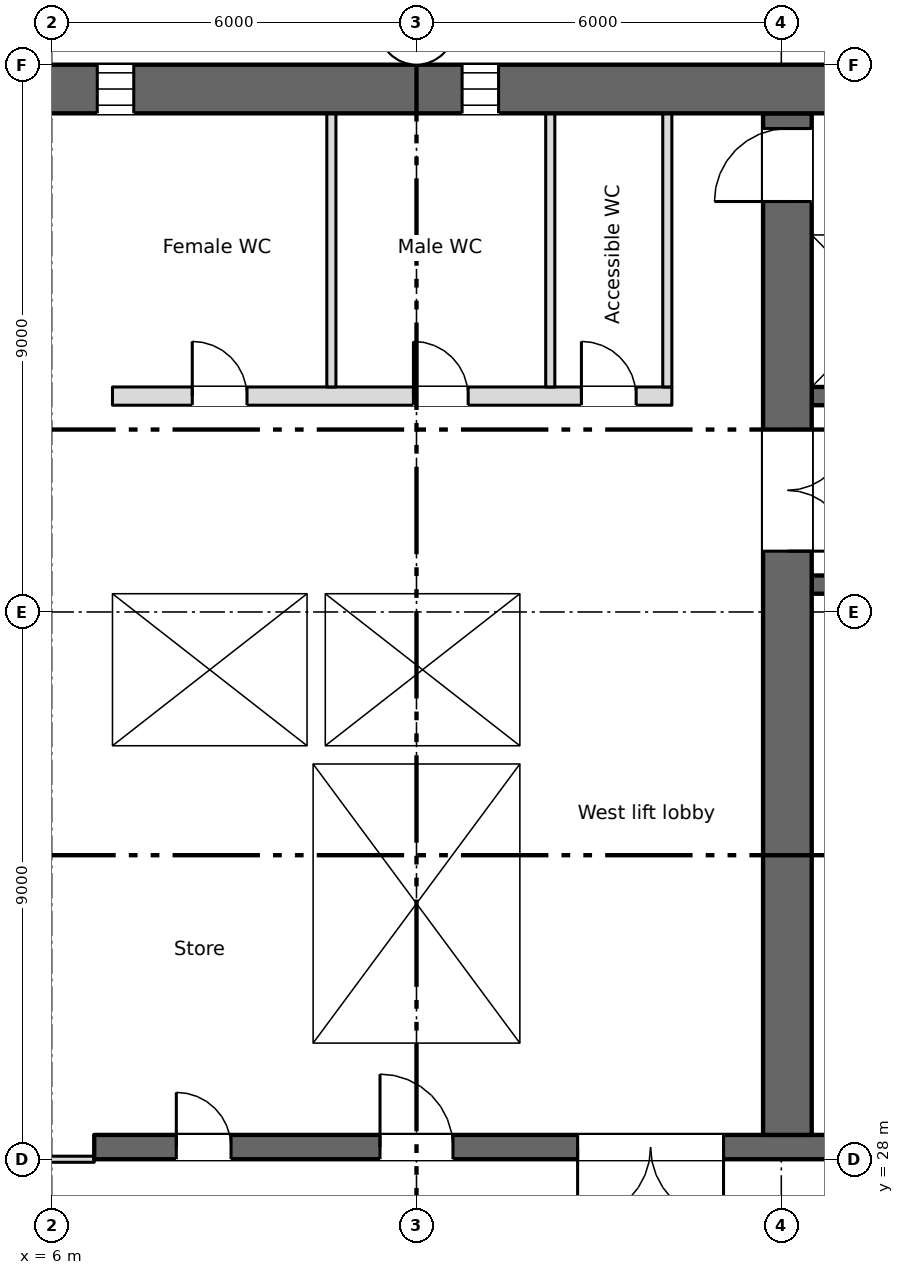
"""IFC4 building model, lengths in metres.
Left out: names, types, materials, properties, quantities, classifications, styles, units other than length and angle.
Written with IfcOpenShell. Run it as: python <this file> out.ifc"""

import sys

from ifc_helpers import new_model, si_unit, direction, frame, frame_2d, origin, place, context, subcontext, project, spatial, rectangle, extrude, element, fill, save


model = new_model("IFC4")
c1 = context("Model", 3, precision=1e-05, world=origin(), true_north=direction((0.0, 1.0)))
c2 = subcontext(c1, "Body", "Model", "MODEL_VIEW")
j1 = project(units=[si_unit("LENGTHUNIT", "METRE"), si_unit("PLANEANGLEUNIT", "RADIAN")], contexts=[c1])
p1 = place(None, origin())
s1 = spatial("IfcSite", under=j1, at=p1, CompositionType="ELEMENT")
p2 = place(p1, origin())
s2 = spatial("IfcBuilding", under=s1, at=p2, CompositionType="ELEMENT")
p3 = place(p2, frame((0.0, 0.0, 106.25)))
s3 = spatial("IfcBuildingStorey", under=s2, at=p3, CompositionType="ELEMENT", Elevation=106.25)
p4 = place(p3, frame((5.55, 45.6, 0.0), z_axis=(0.0, 0.0, 1.0), x_axis=(1.0, 0.0, 0.0)))
e1 = element("IfcWall", 1, at=p4, inside=s3, PredefinedType="SHEAR", context=c2, shape_type="SweptSolid", body=[
    extrude(rectangle(XDim=60.9, YDim=0.8, at=frame_2d((30.45, 0.0))), origin(), (0.0, 0.0, 1.0), 3.35),
])
p5 = place(p4, frame((1.2, 0.0, 0.6)))
e2 = element("IfcOpeningElement", 2, at=p5, cuts=e1, PredefinedType="OPENING", context=c2, shape_type="SweptSolid", body=[
    extrude(rectangle(XDim=0.6, YDim=2.4, at=frame_2d((0.3, 1.2))), frame((0.0, 0.41, 0.0), z_axis=(0.0, -1.0, 0.0), x_axis=(1.0, 0.0, 0.0)), (0.0, 0.0, 1.0), 0.82),
])
p6 = place(p4, frame((7.2, 0.0, 0.6)))
e3 = element("IfcOpeningElement", 3, at=p6, cuts=e1, PredefinedType="OPENING", context=c2, shape_type="SweptSolid", body=[
    extrude(rectangle(XDim=0.6, YDim=2.4, at=frame_2d((0.3, 1.2))), frame((0.0, 0.41, 0.0), z_axis=(0.0, -1.0, 0.0), x_axis=(1.0, 0.0, 0.0)), (0.0, 0.0, 1.0), 0.82),
])
p7 = place(p3, frame((6.7, 28.2, 0.0), z_axis=(0.0, 0.0, 1.0), x_axis=(1.0, 0.0, 0.0)))
e4 = element("IfcWall", 4, at=p7, inside=s3, PredefinedType="SHEAR", context=c2, shape_type="SweptSolid", body=[
    extrude(rectangle(XDim=57.8, YDim=0.4, at=frame_2d((28.9, 0.0))), origin(), (0.0, 0.0, 1.0), 3.35),
])
p8 = place(p7, frame((13.85, 0.0, 0.0)))
e5 = element("IfcOpeningElement", 5, at=p8, cuts=e4, PredefinedType="OPENING", context=c2, shape_type="SweptSolid", body=[
    extrude(rectangle(XDim=0.9, YDim=2.1, at=frame_2d((0.45, 1.05))), frame((0.0, 0.21, 0.0), z_axis=(0.0, -1.0, 0.0), x_axis=(1.0, 0.0, 0.0)), (0.0, 0.0, 1.0), 0.42),
])
p9 = place(p7, frame((48.562, 0.0, 0.0)))
e6 = element("IfcOpeningElement", 6, at=p9, cuts=e4, PredefinedType="OPENING", context=c2, shape_type="SweptSolid", body=[
    extrude(rectangle(XDim=0.9, YDim=2.1, at=frame_2d((0.45, 1.05))), frame((0.0, 0.21, 0.0), z_axis=(0.0, -1.0, 0.0), x_axis=(1.0, 0.0, 0.0)), (0.0, 0.0, 1.0), 0.42),
])
p10 = place(p7, frame((51.137, 0.0, 0.0)))
e7 = element("IfcOpeningElement", 7, at=p10, cuts=e4, PredefinedType="OPENING", context=c2, shape_type="SweptSolid", body=[
    extrude(rectangle(XDim=0.9, YDim=2.1, at=frame_2d((0.45, 1.05))), frame((0.0, 0.21, 0.0), z_axis=(0.0, -1.0, 0.0), x_axis=(1.0, 0.0, 0.0)), (0.0, 0.0, 1.0), 0.42),
])
p11 = place(p7, frame((1.35, 0.0, 0.0)))
e8 = element("IfcOpeningElement", 8, at=p11, cuts=e4, PredefinedType="OPENING", context=c2, shape_type="SweptSolid", body=[
    extrude(rectangle(XDim=0.9, YDim=2.1, at=frame_2d((0.45, 1.05))), frame((0.0, 0.21, 0.0), z_axis=(0.0, -1.0, 0.0), x_axis=(1.0, 0.0, 0.0)), (0.0, 0.0, 1.0), 0.42),
])
p12 = place(p7, frame((4.7, 0.0, 0.0)))
e9 = element("IfcOpeningElement", 9, at=p12, cuts=e4, PredefinedType="OPENING", context=c2, shape_type="SweptSolid", body=[
    extrude(rectangle(XDim=1.2, YDim=2.1, at=frame_2d((0.6, 1.05))), frame((0.0, 0.21, 0.0), z_axis=(0.0, -1.0, 0.0), x_axis=(1.0, 0.0, 0.0)), (0.0, 0.0, 1.0), 0.42),
])
p13 = place(p7, frame((31.7, 0.0, 0.0)))
e10 = element("IfcOpeningElement", 10, at=p13, cuts=e4, PredefinedType="OPENING", context=c2, shape_type="SweptSolid", body=[
    extrude(rectangle(XDim=1.2, YDim=2.1, at=frame_2d((0.6, 1.05))), frame((0.0, 0.21, 0.0), z_axis=(0.0, -1.0, 0.0), x_axis=(1.0, 0.0, 0.0)), (0.0, 0.0, 1.0), 0.42),
])
p14 = place(p7, frame((55.2, 0.0, 0.0)))
e11 = element("IfcOpeningElement", 11, at=p14, cuts=e4, PredefinedType="OPENING", context=c2, shape_type="SweptSolid", body=[
    extrude(rectangle(XDim=1.2, YDim=2.1, at=frame_2d((0.6, 1.05))), frame((0.0, 0.21, 0.0), z_axis=(0.0, -1.0, 0.0), x_axis=(1.0, 0.0, 0.0)), (0.0, 0.0, 1.0), 0.42),
])
p15 = place(p7, frame((21.7, 0.0, 0.0)))
e12 = element("IfcOpeningElement", 12, at=p15, cuts=e4, PredefinedType="OPENING", context=c2, shape_type="SweptSolid", body=[
    extrude(rectangle(XDim=1.2, YDim=2.1, at=frame_2d((0.6, 1.05))), frame((0.0, 0.21, 0.0), z_axis=(0.0, -1.0, 0.0), x_axis=(1.0, 0.0, 0.0)), (0.0, 0.0, 1.0), 0.42),
])
p16 = place(p7, frame((41.7, 0.0, 0.0)))
e13 = element("IfcOpeningElement", 13, at=p16, cuts=e4, PredefinedType="OPENING", context=c2, shape_type="SweptSolid", body=[
    extrude(rectangle(XDim=1.2, YDim=2.1, at=frame_2d((0.6, 1.05))), frame((0.0, 0.21, 0.0), z_axis=(0.0, -1.0, 0.0), x_axis=(1.0, 0.0, 0.0)), (0.0, 0.0, 1.0), 0.42),
])
p17 = place(p7, frame((24.85, 0.0, 0.0)))
e14 = element("IfcOpeningElement", 14, at=p17, cuts=e4, PredefinedType="OPENING", context=c2, shape_type="SweptSolid", body=[
    extrude(rectangle(XDim=2.4, YDim=2.1, at=frame_2d((1.2, 1.05))), frame((0.0, 0.21, 0.0), z_axis=(0.0, -1.0, 0.0), x_axis=(1.0, 0.0, 0.0)), (0.0, 0.0, 1.0), 0.42),
])
p18 = place(p7, frame((37.35, 0.0, 0.0)))
e15 = element("IfcOpeningElement", 15, at=p18, cuts=e4, PredefinedType="OPENING", context=c2, shape_type="SweptSolid", body=[
    extrude(rectangle(XDim=2.4, YDim=2.1, at=frame_2d((1.2, 1.05))), frame((0.0, 0.21, 0.0), z_axis=(0.0, -1.0, 0.0), x_axis=(1.0, 0.0, 0.0)), (0.0, 0.0, 1.0), 0.42),
])
p19 = place(p7, frame((7.95, 0.0, 0.0)))
e16 = element("IfcOpeningElement", 16, at=p19, cuts=e4, PredefinedType="OPENING", context=c2, shape_type="SweptSolid", body=[
    extrude(rectangle(XDim=2.4, YDim=2.1, at=frame_2d((1.2, 1.05))), frame((0.0, 0.21, 0.0), z_axis=(0.0, -1.0, 0.0), x_axis=(1.0, 0.0, 0.0)), (0.0, 0.0, 1.0), 0.42),
])
p20 = place(p7, frame((28.85, 0.0, 0.0)))
e17 = element("IfcOpeningElement", 17, at=p20, cuts=e4, PredefinedType="OPENING", context=c2, shape_type="SweptSolid", body=[
    extrude(rectangle(XDim=0.9, YDim=2.1, at=frame_2d((0.45, 1.05))), frame((0.0, 0.21, 0.0), z_axis=(0.0, -1.0, 0.0), x_axis=(1.0, 0.0, 0.0)), (0.0, 0.0, 1.0), 0.42),
])
p21 = place(p7, frame((34.85, 0.0, 0.0)))
e18 = element("IfcOpeningElement", 18, at=p21, cuts=e4, PredefinedType="OPENING", context=c2, shape_type="SweptSolid", body=[
    extrude(rectangle(XDim=0.9, YDim=2.1, at=frame_2d((0.45, 1.05))), frame((0.0, 0.21, 0.0), z_axis=(0.0, -1.0, 0.0), x_axis=(1.0, 0.0, 0.0)), (0.0, 0.0, 1.0), 0.42),
])
p22 = place(p3, frame((6.85, 28.4, 0.0), z_axis=(0.0, 0.0, 1.0), x_axis=(0.0, 1.0, 0.0)))
e19 = element("IfcWall", 19, at=p22, inside=s3, PredefinedType="SHEAR", context=c2, shape_type="SweptSolid", body=[
    extrude(rectangle(XDim=16.8, YDim=0.3, at=frame_2d((8.4, 0.0))), origin(), (0.0, 0.0, 1.0), 3.35),
])
p23 = place(p3, frame((18.1, 28.4, 0.0), z_axis=(0.0, 0.0, 1.0), x_axis=(0.0, 1.0, 0.0)))
e20 = element("IfcWall", 20, at=p23, inside=s3, PredefinedType="SHEAR", context=c2, shape_type="SweptSolid", body=[
    extrude(rectangle(XDim=16.8, YDim=0.8, at=frame_2d((8.4, 0.0))), origin(), (0.0, 0.0, 1.0), 3.35),
])
p24 = place(p23, frame((9.6, 0.0, 0.0)))
e21 = element("IfcOpeningElement", 21, at=p24, cuts=e20, PredefinedType="OPENING", context=c2, shape_type="SweptSolid", body=[
    extrude(rectangle(XDim=2.0, YDim=2.1, at=frame_2d((1.0, 1.05))), frame((0.0, 0.41, 0.0), z_axis=(0.0, -1.0, 0.0), x_axis=(1.0, 0.0, 0.0)), (0.0, 0.0, 1.0), 0.82),
])
p25 = place(p23, frame((15.35, 0.0, 0.0)))
e22 = element("IfcOpeningElement", 22, at=p25, cuts=e20, PredefinedType="OPENING", context=c2, shape_type="SweptSolid", body=[
    extrude(rectangle(XDim=1.2, YDim=2.1, at=frame_2d((0.6, 1.05))), frame((0.0, 0.41, 0.0), z_axis=(0.0, -1.0, 0.0), x_axis=(1.0, 0.0, 0.0)), (0.0, 0.0, 1.0), 0.82),
])
for number, where, z_axis, x_axis in (
    (23, (10.15, 28.4, 0.0), (0.0, 0.0, 1.0), (0.0, 1.0, 0.0)),
    (24, (13.85, 28.4, 0.0), (0.0, 0.0, 1.0), (0.0, 1.0, 0.0)),
):
    element("IfcWall", number, at=place(p3, frame(where, z_axis=z_axis, x_axis=x_axis)), inside=s3, PredefinedType="SHEAR", context=c2, shape_type="SweptSolid", body=[
        extrude(rectangle(XDim=6.1, YDim=0.3, at=frame_2d((3.05, 0.0))), origin(), (0.0, 0.0, 1.0), 3.35),
    ])
p26 = place(p3, frame((7.0, 34.65, 0.0), z_axis=(0.0, 0.0, 1.0), x_axis=(1.0, 0.0, 0.0)))
e25 = element("IfcWall", 25, at=p26, inside=s3, PredefinedType="SHEAR", context=c2, shape_type="SweptSolid", body=[
    extrude(rectangle(XDim=7.0, YDim=0.3, at=frame_2d((3.5, 0.0))), origin(), (0.0, 0.0, 1.0), 3.35),
])
p27 = place(p3, frame((18.5, 34.65, 0.0), z_axis=(0.0, 0.0, 1.0), x_axis=(1.0, 0.0, 0.0)))
e26 = element("IfcWall", 26, at=p27, inside=s3, PredefinedType="SHEAR", context=c2, shape_type="SweptSolid", body=[
    extrude(rectangle(XDim=12.2, YDim=0.3, at=frame_2d((6.1, 0.0))), origin(), (0.0, 0.0, 1.0), 3.35),
])
p28 = place(p27, frame((9.8, 0.0, 0.0)))
e27 = element("IfcOpeningElement", 27, at=p28, cuts=e26, PredefinedType="OPENING", context=c2, shape_type="SweptSolid", body=[
    extrude(rectangle(XDim=1.1, YDim=2.1, at=frame_2d((0.55, 1.05))), frame((0.0, 0.16, 0.0), z_axis=(0.0, -1.0, 0.0), x_axis=(1.0, 0.0, 0.0)), (0.0, 0.0, 1.0), 0.32),
])
p29 = place(p3, frame((7.0, 37.45, 0.0), z_axis=(0.0, 0.0, 1.0), x_axis=(1.0, 0.0, 0.0)))
e28 = element("IfcWall", 28, at=p29, inside=s3, PredefinedType="SHEAR", context=c2, shape_type="SweptSolid", body=[
    extrude(rectangle(XDim=7.0, YDim=0.3, at=frame_2d((3.5, 0.0))), origin(), (0.0, 0.0, 1.0), 3.35),
])
p30 = place(p3, frame((30.7, 37.45, 0.0), z_axis=(0.0, 0.0, 1.0), x_axis=(-1.0, 0.0, 0.0)))
e29 = element("IfcWall", 29, at=p30, inside=s3, PredefinedType="SHEAR", context=c2, shape_type="SweptSolid", body=[
    extrude(rectangle(XDim=12.2, YDim=0.3, at=frame_2d((6.1, 0.0))), origin(), (0.0, 0.0, 1.0), 3.35),
])
p31 = place(p30, frame((7.4, 0.0, 0.0)))
e30 = element("IfcOpeningElement", 30, at=p31, cuts=e29, PredefinedType="OPENING", context=c2, shape_type="SweptSolid", body=[
    extrude(rectangle(XDim=0.9, YDim=2.1, at=frame_2d((0.45, 1.05))), frame((0.0, 0.16, 0.0), z_axis=(0.0, -1.0, 0.0), x_axis=(1.0, 0.0, 0.0)), (0.0, 0.0, 1.0), 0.32),
])
p32 = place(p3, frame((13.85, 34.8, 0.0), z_axis=(0.0, 0.0, 1.0), x_axis=(0.0, 1.0, 0.0)))
e31 = element("IfcWall", 31, at=p32, inside=s3, PredefinedType="SHEAR", context=c2, shape_type="SweptSolid", body=[
    extrude(rectangle(XDim=2.5, YDim=0.3, at=frame_2d((1.25, 0.0))), origin(), (0.0, 0.0, 1.0), 3.35),
])
p33 = place(p3, frame((18.5, 40.55, 0.0), z_axis=(0.0, 0.0, 1.0), x_axis=(1.0, 0.0, 0.0)))
e32 = element("IfcWall", 32, at=p33, inside=s3, PredefinedType="SHEAR", context=c2, shape_type="SweptSolid", body=[
    extrude(rectangle(XDim=41.0, YDim=0.3, at=frame_2d((20.5, 0.0))), origin(), (0.0, 0.0, 1.0), 3.35),
])
p34 = place(p33, frame((18.65, 0.0, 0.0)))
e33 = element("IfcOpeningElement", 33, at=p34, cuts=e32, PredefinedType="OPENING", context=c2, shape_type="SweptSolid", body=[
    extrude(rectangle(XDim=0.9, YDim=2.1, at=frame_2d((0.45, 1.05))), frame((0.0, 0.16, 0.0), z_axis=(0.0, -1.0, 0.0), x_axis=(1.0, 0.0, 0.0)), (0.0, 0.0, 1.0), 0.32),
])
p35 = place(p33, frame((6.175, 0.0, 0.0)))
e34 = element("IfcOpeningElement", 34, at=p35, cuts=e32, PredefinedType="OPENING", context=c2, shape_type="SweptSolid", body=[
    extrude(rectangle(XDim=1.1, YDim=2.1, at=frame_2d((0.55, 1.05))), frame((0.0, 0.16, 0.0), z_axis=(0.0, -1.0, 0.0), x_axis=(1.0, 0.0, 0.0)), (0.0, 0.0, 1.0), 0.32),
])
p36 = place(p33, frame((8.925, 0.0, 0.0)))
e35 = element("IfcOpeningElement", 35, at=p36, cuts=e32, PredefinedType="OPENING", context=c2, shape_type="SweptSolid", body=[
    extrude(rectangle(XDim=1.1, YDim=2.1, at=frame_2d((0.55, 1.05))), frame((0.0, 0.16, 0.0), z_axis=(0.0, -1.0, 0.0), x_axis=(1.0, 0.0, 0.0)), (0.0, 0.0, 1.0), 0.32),
])
p37 = place(p33, frame((11.675, 0.0, 0.0)))
e36 = element("IfcOpeningElement", 36, at=p37, cuts=e32, PredefinedType="OPENING", context=c2, shape_type="SweptSolid", body=[
    extrude(rectangle(XDim=1.1, YDim=2.1, at=frame_2d((0.55, 1.05))), frame((0.0, 0.16, 0.0), z_axis=(0.0, -1.0, 0.0), x_axis=(1.0, 0.0, 0.0)), (0.0, 0.0, 1.0), 0.32),
])
p38 = place(p33, frame((30.925, 0.0, 0.0)))
e37 = element("IfcOpeningElement", 37, at=p38, cuts=e32, PredefinedType="OPENING", context=c2, shape_type="SweptSolid", body=[
    extrude(rectangle(XDim=1.1, YDim=2.1, at=frame_2d((0.55, 1.05))), frame((0.0, 0.16, 0.0), z_axis=(0.0, -1.0, 0.0), x_axis=(1.0, 0.0, 0.0)), (0.0, 0.0, 1.0), 0.32),
])
p39 = place(p33, frame((33.675, 0.0, 0.0)))
e38 = element("IfcOpeningElement", 38, at=p39, cuts=e32, PredefinedType="OPENING", context=c2, shape_type="SweptSolid", body=[
    extrude(rectangle(XDim=1.1, YDim=2.1, at=frame_2d((0.55, 1.05))), frame((0.0, 0.16, 0.0), z_axis=(0.0, -1.0, 0.0), x_axis=(1.0, 0.0, 0.0)), (0.0, 0.0, 1.0), 0.32),
])
p40 = place(p33, frame((36.375, 0.0, 0.0)))
e39 = element("IfcOpeningElement", 39, at=p40, cuts=e32, PredefinedType="OPENING", context=c2, shape_type="SweptSolid", body=[
    extrude(rectangle(XDim=1.2, YDim=2.1, at=frame_2d((0.6, 1.05))), frame((0.0, 0.16, 0.0), z_axis=(0.0, -1.0, 0.0), x_axis=(1.0, 0.0, 0.0)), (0.0, 0.0, 1.0), 0.32),
])
p41 = place(p33, frame((39.15, 0.0, 0.0)))
e40 = element("IfcOpeningElement", 40, at=p41, cuts=e32, PredefinedType="OPENING", context=c2, shape_type="SweptSolid", body=[
    extrude(rectangle(XDim=1.2, YDim=2.1, at=frame_2d((0.6, 1.05))), frame((0.0, 0.16, 0.0), z_axis=(0.0, -1.0, 0.0), x_axis=(1.0, 0.0, 0.0)), (0.0, 0.0, 1.0), 0.32),
])
p42 = place(p3, frame((18.5, 43.35, 0.0), z_axis=(0.0, 0.0, 1.0), x_axis=(1.0, 0.0, 0.0)))
e41 = element("IfcWall", 41, at=p42, inside=s3, PredefinedType="SHEAR", context=c2, shape_type="SweptSolid", body=[
    extrude(rectangle(XDim=41.0, YDim=0.3, at=frame_2d((20.5, 0.0))), origin(), (0.0, 0.0, 1.0), 3.35),
])
p43 = place(p3, frame((7.0, 40.55, 0.0), z_axis=(0.0, 0.0, 1.0), x_axis=(1.0, 0.0, 0.0)))
e42 = element("IfcWall", 42, at=p43, inside=s3, PredefinedType="PARTITIONING", context=c2, shape_type="SweptSolid", body=[
    extrude(rectangle(XDim=9.2, YDim=0.3, at=frame_2d((4.6, 0.0))), origin(), (0.0, 0.0, 1.0), 3.35),
])
p44 = place(p43, frame((1.312, 0.0, 0.0)))
e43 = element("IfcOpeningElement", 43, at=p44, cuts=e42, PredefinedType="OPENING", context=c2, shape_type="SweptSolid", body=[
    extrude(rectangle(XDim=0.9, YDim=2.1, at=frame_2d((0.45, 1.05))), frame((0.0, 0.16, 0.0), z_axis=(0.0, -1.0, 0.0), x_axis=(1.0, 0.0, 0.0)), (0.0, 0.0, 1.0), 0.32),
])
p45 = place(p43, frame((4.95, 0.0, 0.0)))
e44 = element("IfcOpeningElement", 44, at=p45, cuts=e42, PredefinedType="OPENING", context=c2, shape_type="SweptSolid", body=[
    extrude(rectangle(XDim=0.9, YDim=2.1, at=frame_2d((0.45, 1.05))), frame((0.0, 0.16, 0.0), z_axis=(0.0, -1.0, 0.0), x_axis=(1.0, 0.0, 0.0)), (0.0, 0.0, 1.0), 0.32),
])
p46 = place(p43, frame((7.712, 0.0, 0.0)))
e45 = element("IfcOpeningElement", 45, at=p46, cuts=e42, PredefinedType="OPENING", context=c2, shape_type="SweptSolid", body=[
    extrude(rectangle(XDim=0.9, YDim=2.1, at=frame_2d((0.45, 1.05))), frame((0.0, 0.16, 0.0), z_axis=(0.0, -1.0, 0.0), x_axis=(1.0, 0.0, 0.0)), (0.0, 0.0, 1.0), 0.32),
])
p47 = place(p3, frame((10.35, 34.8, 0.0), z_axis=(0.0, 0.0, 1.0), x_axis=(0.0, 1.0, 0.0)))
e46 = element("IfcWall", 46, at=p47, inside=s3, PredefinedType="SHEAR", context=c2, shape_type="SweptSolid", body=[
    extrude(rectangle(XDim=2.5, YDim=0.3, at=frame_2d((1.25, 0.0))), origin(), (0.0, 0.0, 1.0), 3.35),
])
for number, where, z_axis, x_axis in (
    (47, (16.125, 40.7, 0.0), (0.0, 0.0, 1.0), (0.0, 1.0, 0.0)),
    (48, (10.6, 40.7, 0.0), (0.0, 0.0, 1.0), (0.0, 1.0, 0.0)),
    (49, (14.2, 40.7, 0.0), (0.0, 0.0, 1.0), (0.0, 1.0, 0.0)),
):
    element("IfcWall", number, at=place(p3, frame(where, z_axis=z_axis, x_axis=x_axis)), inside=s3, PredefinedType="PARTITIONING", context=c2, shape_type="SweptSolid", body=[
        extrude(rectangle(XDim=4.5, YDim=0.15, at=frame_2d((2.25, 0.0))), origin(), (0.0, 0.0, 1.0), 3.35),
    ])
p48 = place(p3, frame((0.7, 28.0, 0.0), z_axis=(0.0, 0.0, 1.0), x_axis=(1.0, 0.0, 0.0)))
e50 = element("IfcWall", 50, at=p48, inside=s3, PredefinedType="PARTITIONING", context=c2, shape_type="SweptSolid", body=[
    extrude(rectangle(XDim=6.0, YDim=0.1, at=frame_2d((3.0, 0.0))), origin(), (0.0, 0.0, 1.0), 3.35),
])
p49 = place(p48, frame((2.1, 0.0, 0.0)))
e51 = element("IfcOpeningElement", 51, at=p49, cuts=e50, PredefinedType="OPENING", context=c2, shape_type="SweptSolid", body=[
    extrude(rectangle(XDim=1.8, YDim=2.1, at=frame_2d((0.9, 1.05))), frame((0.0, 0.06, 0.0), z_axis=(0.0, -1.0, 0.0), x_axis=(1.0, 0.0, 0.0)), (0.0, 0.0, 1.0), 0.12),
])
p50 = place(p5, origin())
e52 = element("IfcWindow", 52, at=p50, inside=s3, PartitioningType="SINGLE_PANEL", PredefinedType="WINDOW", context=c2, shape_type="SweptSolid", body=[
    extrude(rectangle(XDim=0.6, YDim=2.4, at=frame_2d((0.3, 1.2))), frame((0.0, 0.03, 0.0), z_axis=(0.0, -1.0, 0.0), x_axis=(1.0, 0.0, 0.0)), (0.0, 0.0, 1.0), 0.06),
])
fill(e2, e52)
p51 = place(p6, origin())
e53 = element("IfcWindow", 53, at=p51, inside=s3, PartitioningType="SINGLE_PANEL", PredefinedType="WINDOW", context=c2, shape_type="SweptSolid", body=[
    extrude(rectangle(XDim=0.6, YDim=2.4, at=frame_2d((0.3, 1.2))), frame((0.0, 0.03, 0.0), z_axis=(0.0, -1.0, 0.0), x_axis=(1.0, 0.0, 0.0)), (0.0, 0.0, 1.0), 0.06),
])
fill(e3, e53)
p52 = place(p11, origin())
e54 = element("IfcDoor", 54, at=p52, inside=s3, OperationType="SINGLE_SWING_LEFT", PredefinedType="DOOR", context=c2, shape_type="SweptSolid", body=[
    extrude(rectangle(XDim=0.9, YDim=2.1, at=frame_2d((0.45, 1.05))), frame((0.0, 0.025, 0.0), z_axis=(0.0, -1.0, 0.0), x_axis=(1.0, 0.0, 0.0)), (0.0, 0.0, 1.0), 0.05),
])
fill(e8, e54)
p53 = place(p44, origin())
e55 = element("IfcDoor", 55, at=p53, inside=s3, OperationType="SINGLE_SWING_LEFT", PredefinedType="DOOR", context=c2, shape_type="SweptSolid", body=[
    extrude(rectangle(XDim=0.9, YDim=2.1, at=frame_2d((0.45, 1.05))), frame((0.0, 0.025, 0.0), z_axis=(0.0, -1.0, 0.0), x_axis=(1.0, 0.0, 0.0)), (0.0, 0.0, 1.0), 0.05),
])
fill(e43, e55)
p54 = place(p45, origin())
e56 = element("IfcDoor", 56, at=p54, inside=s3, OperationType="SINGLE_SWING_LEFT", PredefinedType="DOOR", context=c2, shape_type="SweptSolid", body=[
    extrude(rectangle(XDim=0.9, YDim=2.1, at=frame_2d((0.45, 1.05))), frame((0.0, 0.025, 0.0), z_axis=(0.0, -1.0, 0.0), x_axis=(1.0, 0.0, 0.0)), (0.0, 0.0, 1.0), 0.05),
])
fill(e44, e56)
p55 = place(p46, origin())
e57 = element("IfcDoor", 57, at=p55, inside=s3, OperationType="SINGLE_SWING_LEFT", PredefinedType="DOOR", context=c2, shape_type="SweptSolid", body=[
    extrude(rectangle(XDim=0.9, YDim=2.1, at=frame_2d((0.45, 1.05))), frame((0.0, 0.025, 0.0), z_axis=(0.0, -1.0, 0.0), x_axis=(1.0, 0.0, 0.0)), (0.0, 0.0, 1.0), 0.05),
])
fill(e45, e57)
p56 = place(p12, origin())
e58 = element("IfcDoor", 58, at=p56, inside=s3, OperationType="SINGLE_SWING_LEFT", PredefinedType="DOOR", context=c2, shape_type="SweptSolid", body=[
    extrude(rectangle(XDim=1.2, YDim=2.1, at=frame_2d((0.6, 1.05))), frame((0.0, 0.025, 0.0), z_axis=(0.0, -1.0, 0.0), x_axis=(1.0, 0.0, 0.0)), (0.0, 0.0, 1.0), 0.05),
])
fill(e9, e58)
p57 = place(p19, origin())
e59 = element("IfcDoor", 59, at=p57, inside=s3, OperationType="DOUBLE_DOOR_SINGLE_SWING", PredefinedType="DOOR", context=c2, shape_type="SweptSolid", body=[
    extrude(rectangle(XDim=2.4, YDim=2.1, at=frame_2d((1.2, 1.05))), frame((0.0, 0.025, 0.0), z_axis=(0.0, -1.0, 0.0), x_axis=(1.0, 0.0, 0.0)), (0.0, 0.0, 1.0), 0.05),
])
fill(e16, e59)
p58 = place(p24, origin())
e60 = element("IfcDoor", 60, at=p58, inside=s3, OperationType="DOUBLE_DOOR_SINGLE_SWING", PredefinedType="DOOR", context=c2, shape_type="SweptSolid", body=[
    extrude(rectangle(XDim=2.0, YDim=2.1, at=frame_2d((1.0, 1.05))), frame((0.0, 0.025, 0.0), z_axis=(0.0, -1.0, 0.0), x_axis=(1.0, 0.0, 0.0)), (0.0, 0.0, 1.0), 0.05),
])
fill(e21, e60)
p59 = place(p25, origin())
e61 = element("IfcDoor", 61, at=p59, inside=s3, OperationType="SINGLE_SWING_LEFT", PredefinedType="DOOR", context=c2, shape_type="SweptSolid", body=[
    extrude(rectangle(XDim=1.2, YDim=2.1, at=frame_2d((0.6, 1.05))), frame((0.0, 0.025, 0.0), z_axis=(0.0, -1.0, 0.0), x_axis=(1.0, 0.0, 0.0)), (0.0, 0.0, 1.0), 0.05),
])
fill(e22, e61)
save(model, sys.argv[1])
